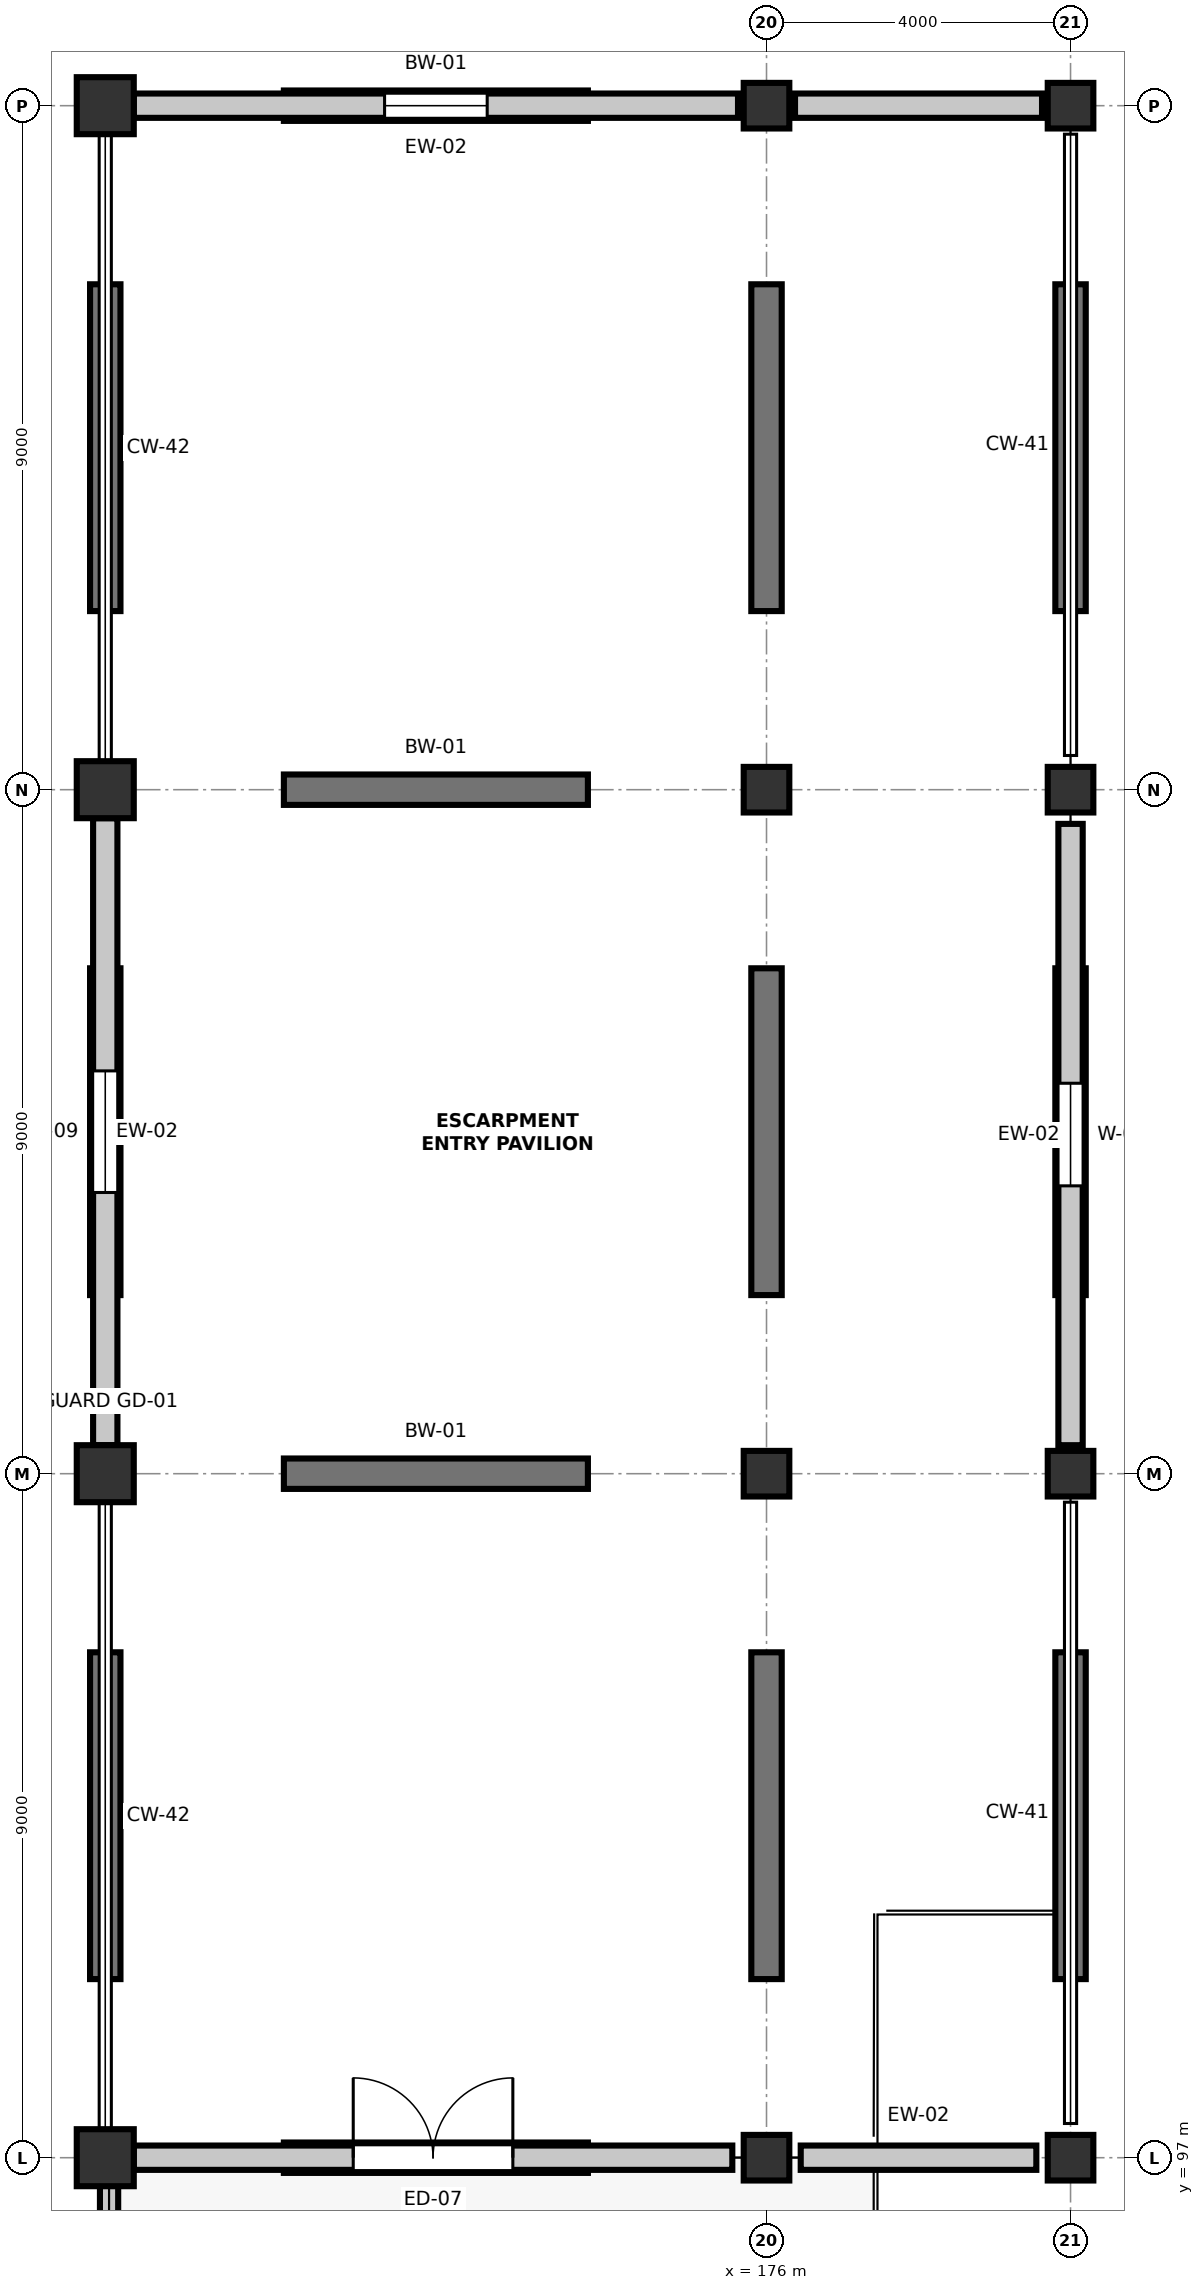
"""IFC4 building model, lengths in metres.
Left out: names, types, materials, properties, quantities, classifications, styles, units other than length and angle.
Written with IfcOpenShell. Run it as: python <this file> out.ifc"""

import sys

from ifc_helpers import new_model, si_unit, direction, frame, frame_2d, origin, origin_2d, place, context, subcontext, project, spatial, rectangle, circle, extrude, element, fill, save


model = new_model("IFC4")
c1 = context("Model", 3, precision=1e-05, world=origin(), true_north=direction((0.0, 1.0)))
c2 = subcontext(c1, "Body", "Model", "MODEL_VIEW")
j1 = project(units=[si_unit("LENGTHUNIT", "METRE"), si_unit("PLANEANGLEUNIT", "RADIAN")], contexts=[c1])
p1 = place(None, origin())
s1 = spatial("IfcSite", under=j1, at=p1, CompositionType="ELEMENT")
p2 = place(p1, origin())
s2 = spatial("IfcBuilding", under=s1, at=p2, CompositionType="ELEMENT")
p3 = place(p2, frame((0.0, 0.0, 4.8)))
s3 = spatial("IfcBuildingStorey", under=s2, at=p3, CompositionType="ELEMENT", Elevation=4.8)
for number, where, z_axis, x_axis in (
    (1, (167.3, 97.0, 0.0), (0.0, 0.0, 1.0), (1.0, 0.0, 0.0)),
    (2, (167.3, 106.0, 0.0), (0.0, 0.0, 1.0), (1.0, 0.0, 0.0)),
    (3, (167.3, 115.0, 0.0), (0.0, 0.0, 1.0), (1.0, 0.0, 0.0)),
    (4, (167.3, 124.0, 0.0), (0.0, 0.0, 1.0), (1.0, 0.0, 0.0)),
):
    element("IfcColumn", number, at=place(p3, frame(where, z_axis=z_axis, x_axis=x_axis)), inside=s3, PredefinedType="COLUMN", context=c2, shape_type="SweptSolid", body=[
        extrude(rectangle(XDim=0.75, YDim=0.75, at=origin_2d()), origin(), (0.0, 0.0, 1.0), 4.8),
    ])
p4 = place(p3, frame((176.0, 97.0, 0.0), z_axis=(0.0, 0.0, 1.0), x_axis=(1.0, 0.0, 0.0)))
e5 = element("IfcColumn", 5, at=p4, inside=s3, PredefinedType="COLUMN", context=c2, shape_type="SweptSolid", body=[
    extrude(circle(Radius=0.45, at=origin_2d()), origin(), (0.0, 0.0, 1.0), 4.8),
])
p5 = place(p3, frame((176.0, 106.0, 0.0), z_axis=(0.0, 0.0, 1.0), x_axis=(1.0, 0.0, 0.0)))
e6 = element("IfcColumn", 6, at=p5, inside=s3, PredefinedType="COLUMN", context=c2, shape_type="SweptSolid", body=[
    extrude(circle(Radius=0.375, at=origin_2d()), origin(), (0.0, 0.0, 1.0), 4.8),
])
p6 = place(p3, frame((176.0, 115.0, 0.0), z_axis=(0.0, 0.0, 1.0), x_axis=(1.0, 0.0, 0.0)))
e7 = element("IfcColumn", 7, at=p6, inside=s3, PredefinedType="COLUMN", context=c2, shape_type="SweptSolid", body=[
    extrude(circle(Radius=0.45, at=origin_2d()), origin(), (0.0, 0.0, 1.0), 4.8),
])
p7 = place(p3, frame((176.0, 124.0, 0.0), z_axis=(0.0, 0.0, 1.0), x_axis=(1.0, 0.0, 0.0)))
e8 = element("IfcColumn", 8, at=p7, inside=s3, PredefinedType="COLUMN", context=c2, shape_type="SweptSolid", body=[
    extrude(circle(Radius=0.375, at=origin_2d()), origin(), (0.0, 0.0, 1.0), 4.8),
])
p8 = place(p3, frame((180.0, 97.0, 0.0), z_axis=(0.0, 0.0, 1.0), x_axis=(1.0, 0.0, 0.0)))
e9 = element("IfcColumn", 9, at=p8, inside=s3, PredefinedType="COLUMN", context=c2, shape_type="SweptSolid", body=[
    extrude(circle(Radius=0.45, at=origin_2d()), origin(), (0.0, 0.0, 1.0), 4.8),
])
p9 = place(p3, frame((180.0, 106.0, 0.0), z_axis=(0.0, 0.0, 1.0), x_axis=(1.0, 0.0, 0.0)))
e10 = element("IfcColumn", 10, at=p9, inside=s3, PredefinedType="COLUMN", context=c2, shape_type="SweptSolid", body=[
    extrude(circle(Radius=0.375, at=origin_2d()), origin(), (0.0, 0.0, 1.0), 4.8),
])
p10 = place(p3, frame((180.0, 115.0, 0.0), z_axis=(0.0, 0.0, 1.0), x_axis=(1.0, 0.0, 0.0)))
e11 = element("IfcColumn", 11, at=p10, inside=s3, PredefinedType="COLUMN", context=c2, shape_type="SweptSolid", body=[
    extrude(circle(Radius=0.45, at=origin_2d()), origin(), (0.0, 0.0, 1.0), 4.8),
])
p11 = place(p3, frame((180.0, 124.0, 0.0), z_axis=(0.0, 0.0, 1.0), x_axis=(1.0, 0.0, 0.0)))
e12 = element("IfcColumn", 12, at=p11, inside=s3, PredefinedType="COLUMN", context=c2, shape_type="SweptSolid", body=[
    extrude(circle(Radius=0.375, at=origin_2d()), origin(), (0.0, 0.0, 1.0), 4.8),
])
for number, where, z_axis, x_axis in (
    (13, (169.65, 97.0, -2.1), (0.0, 0.0, 1.0), (1.0, 0.0, 0.0)),
    (14, (169.65, 106.0, -2.1), (0.0, 0.0, 1.0), (1.0, 0.0, 0.0)),
    (15, (169.65, 115.0, -2.1), (0.0, 0.0, 1.0), (1.0, 0.0, 0.0)),
    (16, (169.65, 124.0, -2.1), (0.0, 0.0, 1.0), (1.0, 0.0, 0.0)),
):
    element("IfcWall", number, at=place(p3, frame(where, z_axis=z_axis, x_axis=x_axis)), inside=s3, PredefinedType="SOLIDWALL", context=c2, shape_type="SweptSolid", body=[
        extrude(rectangle(XDim=4.0, YDim=0.4, at=frame_2d((2.0, 0.0))), origin(), (0.0, 0.0, 1.0), 1.85),
    ])
for number, where, z_axis, x_axis in (
    (17, (167.3, 99.35, -2.1), (0.0, 0.0, 1.0), (0.0, 1.0, 0.0)),
    (18, (167.3, 108.35, -2.1), (0.0, 0.0, 1.0), (0.0, 1.0, 0.0)),
    (19, (167.3, 117.35, -2.1), (0.0, 0.0, 1.0), (0.0, 1.0, 0.0)),
    (20, (176.0, 99.35, -2.1), (0.0, 0.0, 1.0), (0.0, 1.0, 0.0)),
    (21, (176.0, 108.35, -2.1), (0.0, 0.0, 1.0), (0.0, 1.0, 0.0)),
    (22, (176.0, 117.35, -2.1), (0.0, 0.0, 1.0), (0.0, 1.0, 0.0)),
    (23, (180.0, 99.35, -2.1), (0.0, 0.0, 1.0), (0.0, 1.0, 0.0)),
    (24, (180.0, 108.35, -2.1), (0.0, 0.0, 1.0), (0.0, 1.0, 0.0)),
    (25, (180.0, 117.35, -2.1), (0.0, 0.0, 1.0), (0.0, 1.0, 0.0)),
):
    element("IfcWall", number, at=place(p3, frame(where, z_axis=z_axis, x_axis=x_axis)), inside=s3, PredefinedType="SOLIDWALL", context=c2, shape_type="SweptSolid", body=[
        extrude(rectangle(XDim=4.3, YDim=0.4, at=frame_2d((2.15, 0.0))), origin(), (0.0, 0.0, 1.0), 1.85),
    ])
p12 = place(p3, frame((167.675, 97.0, 0.0), z_axis=(0.0, 0.0, 1.0), x_axis=(1.0, 0.0, 0.0)))
e26 = element("IfcWall", 26, at=p12, inside=s3, PredefinedType="STANDARD", context=c2, shape_type="SweptSolid", body=[
    extrude(rectangle(XDim=7.875, YDim=0.32, at=frame_2d((3.938, 0.0))), origin(), (0.0, 0.0, 1.0), 4.55),
])
p13 = place(p12, frame((2.887, 0.0, 0.0)))
e27 = element("IfcOpeningElement", 27, at=p13, cuts=e26, PredefinedType="OPENING", context=c2, shape_type="SweptSolid", body=[
    extrude(rectangle(XDim=2.1, YDim=2.35, at=frame_2d((1.05, 1.175))), frame((0.0, 0.17, 0.0), z_axis=(0.0, -1.0, 0.0), x_axis=(1.0, 0.0, 0.0)), (0.0, 0.0, 1.0), 0.34),
])
p14 = place(p3, frame((176.45, 97.0, 0.0), z_axis=(0.0, 0.0, 1.0), x_axis=(1.0, 0.0, 0.0)))
e28 = element("IfcWall", 28, at=p14, inside=s3, PredefinedType="STANDARD", context=c2, shape_type="SweptSolid", body=[
    extrude(rectangle(XDim=3.1, YDim=0.32, at=frame_2d((1.55, 0.0))), origin(), (0.0, 0.0, 1.0), 4.55),
])
p15 = place(p3, frame((180.0, 106.375, 0.0), z_axis=(0.0, 0.0, 1.0), x_axis=(0.0, 1.0, 0.0)))
e29 = element("IfcWall", 29, at=p15, inside=s3, PredefinedType="STANDARD", context=c2, shape_type="SweptSolid", body=[
    extrude(rectangle(XDim=8.175, YDim=0.32, at=frame_2d((4.087, 0.0))), origin(), (0.0, 0.0, 1.0), 4.55),
])
p16 = place(p15, frame((3.413, 0.0, 0.95)))
e30 = element("IfcOpeningElement", 30, at=p16, cuts=e29, PredefinedType="OPENING", context=c2, shape_type="SweptSolid", body=[
    extrude(rectangle(XDim=1.35, YDim=1.95, at=frame_2d((0.675, 0.975))), frame((0.0, 0.17, 0.0), z_axis=(0.0, -1.0, 0.0), x_axis=(1.0, 0.0, 0.0)), (0.0, 0.0, 1.0), 0.34),
])
p17 = place(p3, frame((175.625, 124.0, 0.0), z_axis=(0.0, 0.0, 1.0), x_axis=(-1.0, 0.0, 0.0)))
e31 = element("IfcWall", 31, at=p17, inside=s3, PredefinedType="STANDARD", context=c2, shape_type="SweptSolid", body=[
    extrude(rectangle(XDim=7.95, YDim=0.32, at=frame_2d((3.975, 0.0))), origin(), (0.0, 0.0, 1.0), 4.55),
])
p18 = place(p17, frame((3.3, 0.0, 0.95)))
e32 = element("IfcOpeningElement", 32, at=p18, cuts=e31, PredefinedType="OPENING", context=c2, shape_type="SweptSolid", body=[
    extrude(rectangle(XDim=1.35, YDim=2.15, at=frame_2d((0.675, 1.075))), frame((0.0, 0.17, 0.0), z_axis=(0.0, -1.0, 0.0), x_axis=(1.0, 0.0, 0.0)), (0.0, 0.0, 1.0), 0.34),
])
p19 = place(p3, frame((179.625, 124.0, 0.0), z_axis=(0.0, 0.0, 1.0), x_axis=(-1.0, 0.0, 0.0)))
e33 = element("IfcWall", 33, at=p19, inside=s3, PredefinedType="STANDARD", context=c2, shape_type="SweptSolid", body=[
    extrude(rectangle(XDim=3.25, YDim=0.32, at=frame_2d((1.625, 0.0))), origin(), (0.0, 0.0, 1.0), 4.55),
])
p20 = place(p3, frame((167.3, 114.625, 0.0), z_axis=(0.0, 0.0, 1.0), x_axis=(0.0, -1.0, 0.0)))
e34 = element("IfcWall", 34, at=p20, inside=s3, PredefinedType="STANDARD", context=c2, shape_type="SweptSolid", body=[
    extrude(rectangle(XDim=8.25, YDim=0.32, at=frame_2d((4.125, 0.0))), origin(), (0.0, 0.0, 1.0), 4.55),
])
p21 = place(p20, frame((3.325, 0.0, 0.95)))
e35 = element("IfcOpeningElement", 35, at=p21, cuts=e34, PredefinedType="OPENING", context=c2, shape_type="SweptSolid", body=[
    extrude(rectangle(XDim=1.6, YDim=1.45, at=frame_2d((0.8, 0.725))), frame((0.0, 0.17, 0.0), z_axis=(0.0, -1.0, 0.0), x_axis=(1.0, 0.0, 0.0)), (0.0, 0.0, 1.0), 0.34),
])
p22 = place(p3, frame((167.35, 48.97, 0.0), z_axis=(0.0, 0.0, 1.0), x_axis=(0.0, 1.0, 0.0)))
e36 = element("IfcWall", 36, at=p22, inside=s3, PredefinedType="PARAPET", context=c2, shape_type="SweptSolid", body=[
    extrude(rectangle(XDim=47.815, YDim=0.24, at=frame_2d((23.907, 0.0))), origin(), (0.0, 0.0, 1.0), 0.34),
])
p23 = place(p13, origin())
e37 = element("IfcDoor", 37, at=p23, inside=s3, OperationType="DOUBLE_DOOR_SINGLE_SWING", PredefinedType="DOOR", context=c2, shape_type="SweptSolid", body=[
    extrude(rectangle(XDim=2.1, YDim=2.35, at=frame_2d((1.05, 1.175))), frame((0.0, 0.025, 0.0), z_axis=(0.0, -1.0, 0.0), x_axis=(1.0, 0.0, 0.0)), (0.0, 0.0, 1.0), 0.05),
])
fill(e27, e37)
p24 = place(p16, origin())
e38 = element("IfcWindow", 38, at=p24, inside=s3, PartitioningType="SINGLE_PANEL", PredefinedType="WINDOW", context=c2, shape_type="SweptSolid", body=[
    extrude(rectangle(XDim=1.35, YDim=1.95, at=frame_2d((0.675, 0.975))), frame((0.0, 0.03, 0.0), z_axis=(0.0, -1.0, 0.0), x_axis=(1.0, 0.0, 0.0)), (0.0, 0.0, 1.0), 0.06),
])
fill(e30, e38)
p25 = place(p18, origin())
e39 = element("IfcWindow", 39, at=p25, inside=s3, PartitioningType="SINGLE_PANEL", PredefinedType="WINDOW", context=c2, shape_type="SweptSolid", body=[
    extrude(rectangle(XDim=1.35, YDim=2.15, at=frame_2d((0.675, 1.075))), frame((0.0, 0.03, 0.0), z_axis=(0.0, -1.0, 0.0), x_axis=(1.0, 0.0, 0.0)), (0.0, 0.0, 1.0), 0.06),
])
fill(e32, e39)
p26 = place(p21, origin())
e40 = element("IfcWindow", 40, at=p26, inside=s3, PartitioningType="SINGLE_PANEL", PredefinedType="WINDOW", context=c2, shape_type="SweptSolid", body=[
    extrude(rectangle(XDim=1.6, YDim=1.45, at=frame_2d((0.8, 0.725))), frame((0.0, 0.03, 0.0), z_axis=(0.0, -1.0, 0.0), x_axis=(1.0, 0.0, 0.0)), (0.0, 0.0, 1.0), 0.06),
])
fill(e35, e40)
save(model, sys.argv[1])
